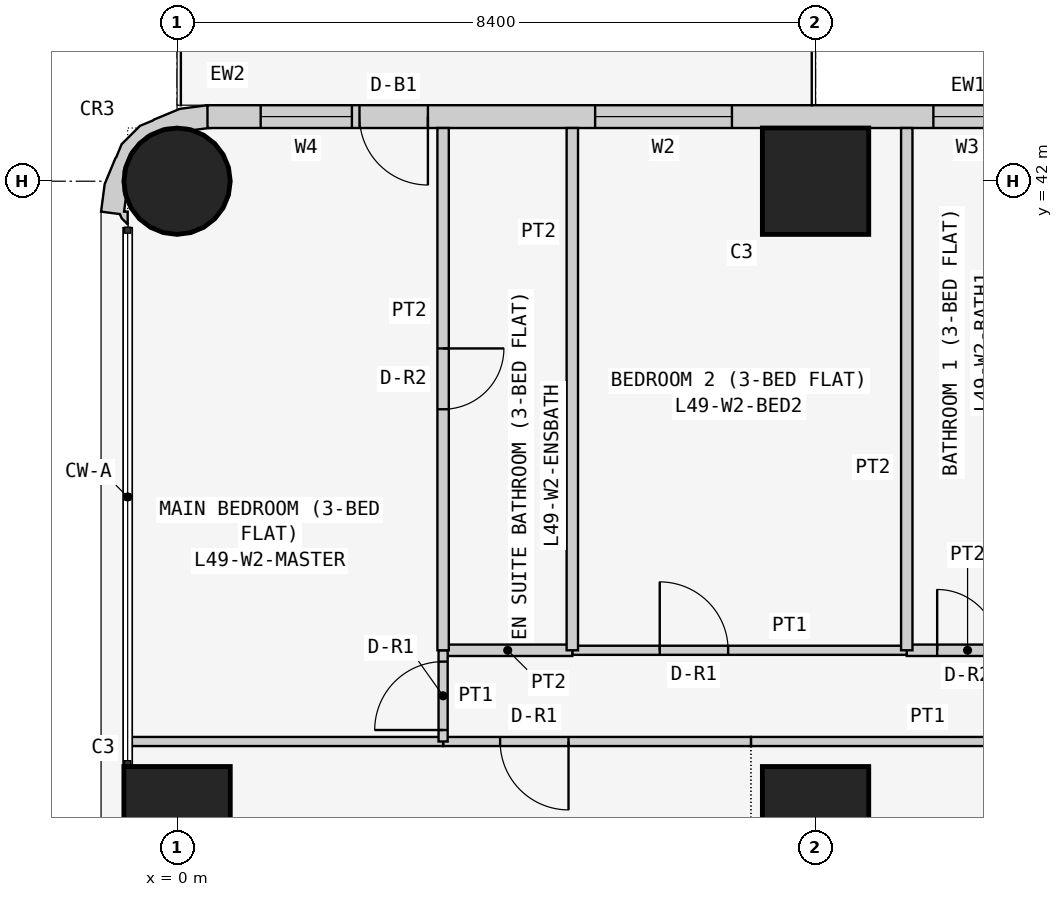
"""IFC4 building model, lengths in metres.
Left out: names, types, materials, properties, quantities, classifications, styles, units other than length and angle.
Written with IfcOpenShell. Run it as: python <this file> out.ifc"""

import sys

from ifc_helpers import new_model, si_unit, direction, frame, frame_2d, origin, origin_2d, place, context, subcontext, project, spatial, polyline, rectangle, circle, outline, extrude, element, fill, save


model = new_model("IFC4")
c1 = context("Model", 3, precision=1e-05, world=origin(), true_north=direction((0.0, 1.0)))
c2 = subcontext(c1, "Body", "Model", "MODEL_VIEW")
j1 = project(units=[si_unit("LENGTHUNIT", "METRE"), si_unit("PLANEANGLEUNIT", "RADIAN")], contexts=[c1])
p1 = place(None, origin())
s1 = spatial("IfcSite", under=j1, at=p1, CompositionType="ELEMENT")
p2 = place(p1, origin())
s2 = spatial("IfcBuilding", under=s1, at=p2, CompositionType="ELEMENT")
p3 = place(p2, frame((0.0, 0.0, 190.5)))
s3 = spatial("IfcBuildingStorey", under=s2, at=p3, CompositionType="ELEMENT", Elevation=190.5)
p4 = place(p3, frame((0.0, 33.6, 0.0), z_axis=(0.0, 0.0, 1.0), x_axis=(1.0, 0.0, 0.0)))
e1 = element("IfcColumn", 1, at=p4, inside=s3, PredefinedType="COLUMN", context=c2, shape_type="SweptSolid", body=[
    extrude(rectangle(XDim=1.4, YDim=1.4, at=origin_2d()), origin(), (0.0, 0.0, 1.0), 3.6),
])
p5 = place(p3, frame((0.0, 42.0, 0.0), z_axis=(0.0, 0.0, 1.0), x_axis=(1.0, 0.0, 0.0)))
e2 = element("IfcColumn", 2, at=p5, inside=s3, PredefinedType="COLUMN", context=c2, shape_type="SweptSolid", body=[
    extrude(circle(Radius=0.7, at=origin_2d()), origin(), (0.0, 0.0, 1.0), 3.6),
])
for number, where, z_axis, x_axis in (
    (3, (8.4, 33.6, 0.0), (0.0, 0.0, 1.0), (1.0, 0.0, 0.0)),
    (4, (8.4, 42.0, 0.0), (0.0, 0.0, 1.0), (1.0, 0.0, 0.0)),
):
    element("IfcColumn", number, at=place(p3, frame(where, z_axis=z_axis, x_axis=x_axis)), inside=s3, PredefinedType="COLUMN", context=c2, shape_type="SweptSolid", body=[
        extrude(rectangle(XDim=1.4, YDim=1.4, at=origin_2d()), origin(), (0.0, 0.0, 1.0), 3.6),
    ])
p6 = place(p3, frame((15.8, 42.85, 0.0), z_axis=(0.0, 0.0, 1.0), x_axis=(-1.0, 0.0, 0.0)))
e5 = element("IfcWall", 5, at=p6, inside=s3, PredefinedType="SOLIDWALL", context=c2, shape_type="SweptSolid", body=[
    extrude(rectangle(XDim=15.4, YDim=0.3, at=frame_2d((7.7, 0.0))), origin(), (0.0, 0.0, 1.0), 3.45),
])
p7 = place(p6, frame((1.2, 0.0, 0.9)))
e6 = element("IfcOpeningElement", 6, at=p7, cuts=e5, PredefinedType="OPENING", context=c2, shape_type="SweptSolid", body=[
    extrude(rectangle(XDim=1.8, YDim=1.5, at=frame_2d((0.9, 0.75))), frame((0.0, 0.16, 0.0), z_axis=(0.0, -1.0, 0.0), x_axis=(1.0, 0.0, 0.0)), (0.0, 0.0, 1.0), 0.32),
])
p8 = place(p6, frame((4.95, 0.0, 1.5)))
e7 = element("IfcOpeningElement", 7, at=p8, cuts=e5, PredefinedType="OPENING", context=c2, shape_type="SweptSolid", body=[
    extrude(rectangle(XDim=0.9, YDim=0.7, at=frame_2d((0.45, 0.35))), frame((0.0, 0.16, 0.0), z_axis=(0.0, -1.0, 0.0), x_axis=(1.0, 0.0, 0.0)), (0.0, 0.0, 1.0), 0.32),
])
p9 = place(p6, frame((8.5, 0.0, 0.9)))
e8 = element("IfcOpeningElement", 8, at=p9, cuts=e5, PredefinedType="OPENING", context=c2, shape_type="SweptSolid", body=[
    extrude(rectangle(XDim=1.8, YDim=1.5, at=frame_2d((0.9, 0.75))), frame((0.0, 0.16, 0.0), z_axis=(0.0, -1.0, 0.0), x_axis=(1.0, 0.0, 0.0)), (0.0, 0.0, 1.0), 0.32),
])
p10 = place(p6, frame((12.5, 0.0, 0.0)))
e9 = element("IfcOpeningElement", 9, at=p10, cuts=e5, PredefinedType="OPENING", context=c2, shape_type="SweptSolid", body=[
    extrude(rectangle(XDim=0.9, YDim=2.4, at=frame_2d((0.45, 1.2))), frame((0.0, 0.16, 0.0), z_axis=(0.0, -1.0, 0.0), x_axis=(1.0, 0.0, 0.0)), (0.0, 0.0, 1.0), 0.32),
])
p11 = place(p6, frame((13.5, 0.0, 0.9)))
e10 = element("IfcOpeningElement", 10, at=p11, cuts=e5, PredefinedType="OPENING", context=c2, shape_type="SweptSolid", body=[
    extrude(rectangle(XDim=1.2, YDim=1.5, at=frame_2d((0.6, 0.75))), frame((0.0, 0.16, 0.0), z_axis=(0.0, -1.0, 0.0), x_axis=(1.0, 0.0, 0.0)), (0.0, 0.0, 1.0), 0.32),
])
p12 = place(p3, frame((0.29, 42.724, 0.0), z_axis=(0.0, 0.0, 1.0), x_axis=(-0.898030234854, 0.439933741929, 0.0)))
e11 = element("IfcWall", 11, at=p12, inside=s3, PredefinedType="SOLIDWALL", context=c2, shape_type="SweptSolid", body=[
    extrude(outline(polyline([(-0.145, -0.044), (0.022, -0.296), (0.327, -0.094), (0.568, 0.18), (0.578, 0.199), (0.7, 0.338), (0.811, 0.661), (0.799, 0.846), (0.803, 0.866), (0.78, 1.231), (0.664, 1.577), (0.426, 1.497), (0.382, 1.536), (0.276, 1.572), (0.349, 1.423), (0.392, 1.444), (0.453, 1.261), (0.51, 1.211), (0.632, 0.961), (0.65, 0.683), (0.56, 0.419), (0.375, 0.21), (0.125, 0.087), (0.05, 0.082), (-0.127, -0.035), (-0.145, -0.044)])), origin(), (0.0, 0.0, 1.0), 3.45),
])
p13 = place(p3, frame((7.55, 34.629, 0.0), z_axis=(0.0, 0.0, 1.0), x_axis=(1.0, 0.0, 0.0)))
e12 = element("IfcWall", 12, at=p13, inside=s3, PredefinedType="PARTITIONING", context=c2, shape_type="SweptSolid", body=[
    extrude(rectangle(XDim=4.65, YDim=0.12, at=frame_2d((2.325, 0.0))), origin(), (0.0, 0.0, 1.0), 3.45),
])
p14 = place(p3, frame((3.5, 34.629, 0.0), z_axis=(0.0, 0.0, 1.0), x_axis=(1.0, 0.0, 0.0)))
e13 = element("IfcWall", 13, at=p14, inside=s3, PredefinedType="PARTITIONING", context=c2, shape_type="SweptSolid", body=[
    extrude(rectangle(XDim=4.05, YDim=0.12, at=frame_2d((2.025, 0.0))), origin(), (0.0, 0.0, 1.0), 3.45),
])
p15 = place(p14, frame((0.75, 0.0, 0.0)))
e14 = element("IfcOpeningElement", 14, at=p15, cuts=e13, PredefinedType="OPENING", context=c2, shape_type="SweptSolid", body=[
    extrude(rectangle(XDim=0.9, YDim=2.1, at=frame_2d((0.45, 1.05))), frame((0.0, 0.07, 0.0), z_axis=(0.0, -1.0, 0.0), x_axis=(1.0, 0.0, 0.0)), (0.0, 0.0, 1.0), 0.14),
])
p16 = place(p3, frame((-0.65, 34.629, 0.0), z_axis=(0.0, 0.0, 1.0), x_axis=(1.0, 0.0, 0.0)))
e15 = element("IfcWall", 15, at=p16, inside=s3, PredefinedType="PARTITIONING", context=c2, shape_type="SweptSolid", body=[
    extrude(rectangle(XDim=4.15, YDim=0.12, at=frame_2d((2.075, 0.0))), origin(), (0.0, 0.0, 1.0), 3.45),
])
p17 = place(p3, frame((9.6, 35.829, 0.0), z_axis=(0.0, 0.0, 1.0), x_axis=(1.0, 0.0, 0.0)))
e16 = element("IfcWall", 16, at=p17, inside=s3, PredefinedType="PARTITIONING", context=c2, shape_type="SweptSolid", body=[
    extrude(rectangle(XDim=1.6, YDim=0.15, at=frame_2d((0.8, 0.0))), origin(), (0.0, 0.0, 1.0), 3.45),
])
p18 = place(p17, frame((0.4, 0.0, 0.0)))
e17 = element("IfcOpeningElement", 17, at=p18, cuts=e16, PredefinedType="OPENING", context=c2, shape_type="SweptSolid", body=[
    extrude(rectangle(XDim=0.8, YDim=2.1, at=frame_2d((0.4, 1.05))), frame((0.0, 0.085, 0.0), z_axis=(0.0, -1.0, 0.0), x_axis=(1.0, 0.0, 0.0)), (0.0, 0.0, 1.0), 0.17),
])
p19 = place(p3, frame((5.2, 35.829, 0.0), z_axis=(0.0, 0.0, 1.0), x_axis=(1.0, 0.0, 0.0)))
e18 = element("IfcWall", 18, at=p19, inside=s3, PredefinedType="PARTITIONING", context=c2, shape_type="SweptSolid", body=[
    extrude(rectangle(XDim=4.4, YDim=0.12, at=frame_2d((2.2, 0.0))), origin(), (0.0, 0.0, 1.0), 3.45),
])
p20 = place(p19, frame((1.15, 0.0, 0.0)))
e19 = element("IfcOpeningElement", 19, at=p20, cuts=e18, PredefinedType="OPENING", context=c2, shape_type="SweptSolid", body=[
    extrude(rectangle(XDim=0.9, YDim=2.1, at=frame_2d((0.45, 1.05))), frame((0.0, 0.07, 0.0), z_axis=(0.0, -1.0, 0.0), x_axis=(1.0, 0.0, 0.0)), (0.0, 0.0, 1.0), 0.14),
])
p21 = place(p3, frame((3.5, 35.829, 0.0), z_axis=(0.0, 0.0, 1.0), x_axis=(1.0, 0.0, 0.0)))
e20 = element("IfcWall", 20, at=p21, inside=s3, PredefinedType="PARTITIONING", context=c2, shape_type="SweptSolid", body=[
    extrude(rectangle(XDim=1.7, YDim=0.15, at=frame_2d((0.85, 0.0))), origin(), (0.0, 0.0, 1.0), 3.45),
])
p22 = place(p3, frame((3.5, 34.629, 0.0), z_axis=(0.0, 0.0, 1.0), x_axis=(0.0, 1.0, 0.0)))
e21 = element("IfcWall", 21, at=p22, inside=s3, PredefinedType="PARTITIONING", context=c2, shape_type="SweptSolid", body=[
    extrude(rectangle(XDim=1.2, YDim=0.12, at=frame_2d((0.6, 0.0))), origin(), (0.0, 0.0, 1.0), 3.45),
])
p23 = place(p22, frame((0.151, 0.0, 0.0)))
e22 = element("IfcOpeningElement", 22, at=p23, cuts=e21, PredefinedType="OPENING", context=c2, shape_type="SweptSolid", body=[
    extrude(rectangle(XDim=0.9, YDim=2.1, at=frame_2d((0.45, 1.05))), frame((0.0, 0.07, 0.0), z_axis=(0.0, -1.0, 0.0), x_axis=(1.0, 0.0, 0.0)), (0.0, 0.0, 1.0), 0.14),
])
for number, where, z_axis, x_axis in (
    (23, (9.6, 35.829, 0.0), (0.0, 0.0, 1.0), (0.0, 1.0, 0.0)),
    (24, (5.2, 35.829, 0.0), (0.0, 0.0, 1.0), (0.0, 1.0, 0.0)),
):
    element("IfcWall", number, at=place(p3, frame(where, z_axis=z_axis, x_axis=x_axis)), inside=s3, PredefinedType="PARTITIONING", context=c2, shape_type="SweptSolid", body=[
        extrude(rectangle(XDim=6.871, YDim=0.15, at=frame_2d((3.436, 0.0))), origin(), (0.0, 0.0, 1.0), 3.45),
    ])
p24 = place(p3, frame((3.5, 35.829, 0.0), z_axis=(0.0, 0.0, 1.0), x_axis=(0.0, 1.0, 0.0)))
e25 = element("IfcWall", 25, at=p24, inside=s3, PredefinedType="PARTITIONING", context=c2, shape_type="SweptSolid", body=[
    extrude(rectangle(XDim=6.871, YDim=0.15, at=frame_2d((3.436, 0.0))), origin(), (0.0, 0.0, 1.0), 3.45),
])
p25 = place(p24, frame((3.171, 0.0, 0.0)))
e26 = element("IfcOpeningElement", 26, at=p25, cuts=e25, PredefinedType="OPENING", context=c2, shape_type="SweptSolid", body=[
    extrude(rectangle(XDim=0.8, YDim=2.1, at=frame_2d((0.4, 1.05))), frame((0.0, 0.085, 0.0), z_axis=(0.0, -1.0, 0.0), x_axis=(1.0, 0.0, 0.0)), (0.0, 0.0, 1.0), 0.17),
])
p26 = place(p8, origin())
e27 = element("IfcWindow", 27, at=p26, inside=s3, PartitioningType="SINGLE_PANEL", PredefinedType="WINDOW", context=c2, shape_type="SweptSolid", body=[
    extrude(rectangle(XDim=0.9, YDim=0.7, at=frame_2d((0.45, 0.35))), frame((0.0, 0.03, 0.0), z_axis=(0.0, -1.0, 0.0), x_axis=(1.0, 0.0, 0.0)), (0.0, 0.0, 1.0), 0.06),
])
fill(e7, e27)
p27 = place(p9, origin())
e28 = element("IfcWindow", 28, at=p27, inside=s3, PartitioningType="SINGLE_PANEL", PredefinedType="WINDOW", context=c2, shape_type="SweptSolid", body=[
    extrude(rectangle(XDim=1.8, YDim=1.5, at=frame_2d((0.9, 0.75))), frame((0.0, 0.03, 0.0), z_axis=(0.0, -1.0, 0.0), x_axis=(1.0, 0.0, 0.0)), (0.0, 0.0, 1.0), 0.06),
])
fill(e8, e28)
p28 = place(p10, origin())
e29 = element("IfcDoor", 29, at=p28, inside=s3, OperationType="SINGLE_SWING_LEFT", PredefinedType="DOOR", context=c2, shape_type="SweptSolid", body=[
    extrude(rectangle(XDim=0.9, YDim=2.4, at=frame_2d((0.45, 1.2))), frame((0.0, 0.025, 0.0), z_axis=(0.0, -1.0, 0.0), x_axis=(1.0, 0.0, 0.0)), (0.0, 0.0, 1.0), 0.05),
])
fill(e9, e29)
p29 = place(p11, origin())
e30 = element("IfcWindow", 30, at=p29, inside=s3, PartitioningType="SINGLE_PANEL", PredefinedType="WINDOW", context=c2, shape_type="SweptSolid", body=[
    extrude(rectangle(XDim=1.2, YDim=1.5, at=frame_2d((0.6, 0.75))), frame((0.0, 0.03, 0.0), z_axis=(0.0, -1.0, 0.0), x_axis=(1.0, 0.0, 0.0)), (0.0, 0.0, 1.0), 0.06),
])
fill(e10, e30)
p30 = place(p15, frame((0.9, 0.0, 0.0), z_axis=(0.0, 0.0, 1.0), x_axis=(-1.0, 0.0, 0.0)))
e31 = element("IfcDoor", 31, at=p30, inside=s3, OperationType="SINGLE_SWING_LEFT", PredefinedType="DOOR", context=c2, shape_type="SweptSolid", body=[
    extrude(rectangle(XDim=0.9, YDim=2.1, at=frame_2d((0.45, 1.05))), frame((0.0, 0.025, 0.0), z_axis=(0.0, -1.0, 0.0), x_axis=(1.0, 0.0, 0.0)), (0.0, 0.0, 1.0), 0.05),
])
fill(e14, e31)
p31 = place(p18, origin())
e32 = element("IfcDoor", 32, at=p31, inside=s3, OperationType="SINGLE_SWING_LEFT", PredefinedType="DOOR", context=c2, shape_type="SweptSolid", body=[
    extrude(rectangle(XDim=0.8, YDim=2.1, at=frame_2d((0.4, 1.05))), frame((0.0, 0.025, 0.0), z_axis=(0.0, -1.0, 0.0), x_axis=(1.0, 0.0, 0.0)), (0.0, 0.0, 1.0), 0.05),
])
fill(e17, e32)
p32 = place(p20, origin())
e33 = element("IfcDoor", 33, at=p32, inside=s3, OperationType="SINGLE_SWING_LEFT", PredefinedType="DOOR", context=c2, shape_type="SweptSolid", body=[
    extrude(rectangle(XDim=0.9, YDim=2.1, at=frame_2d((0.45, 1.05))), frame((0.0, 0.025, 0.0), z_axis=(0.0, -1.0, 0.0), x_axis=(1.0, 0.0, 0.0)), (0.0, 0.0, 1.0), 0.05),
])
fill(e19, e33)
p33 = place(p23, origin())
e34 = element("IfcDoor", 34, at=p33, inside=s3, OperationType="SINGLE_SWING_LEFT", PredefinedType="DOOR", context=c2, shape_type="SweptSolid", body=[
    extrude(rectangle(XDim=0.9, YDim=2.1, at=frame_2d((0.45, 1.05))), frame((0.0, 0.025, 0.0), z_axis=(0.0, -1.0, 0.0), x_axis=(1.0, 0.0, 0.0)), (0.0, 0.0, 1.0), 0.05),
])
fill(e22, e34)
p34 = place(p25, frame((0.8, 0.0, 0.0), z_axis=(0.0, 0.0, 1.0), x_axis=(-1.0, 0.0, 0.0)))
e35 = element("IfcDoor", 35, at=p34, inside=s3, OperationType="SINGLE_SWING_LEFT", PredefinedType="DOOR", context=c2, shape_type="SweptSolid", body=[
    extrude(rectangle(XDim=0.8, YDim=2.1, at=frame_2d((0.4, 1.05))), frame((0.0, 0.025, 0.0), z_axis=(0.0, -1.0, 0.0), x_axis=(1.0, 0.0, 0.0)), (0.0, 0.0, 1.0), 0.05),
])
fill(e26, e35)
save(model, sys.argv[1])
